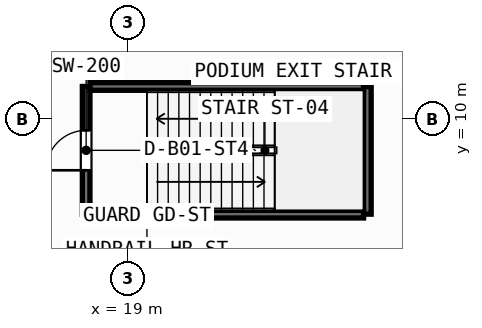
"""IFC4 building model, lengths in metres.
Left out: names, types, materials, properties, quantities, classifications, styles, units other than length and angle.
Written with IfcOpenShell. Run it as: python <this file> out.ifc"""

import sys

from ifc_helpers import new_model, si_unit, direction, frame, frame_2d, origin, place, context, subcontext, project, spatial, rectangle, extrude, source, transform, mapped, element, fill, save


model = new_model("IFC4")
c1 = context("Model", 3, precision=1e-05, world=origin(), true_north=direction((0.0, 1.0)))
c2 = subcontext(c1, "Body", "Model", "MODEL_VIEW")
j1 = project(units=[si_unit("LENGTHUNIT", "METRE"), si_unit("PLANEANGLEUNIT", "RADIAN")], contexts=[c1])
p1 = place(None, origin())
s1 = spatial("IfcSite", under=j1, at=p1, CompositionType="ELEMENT")
p2 = place(p1, origin())
s2 = spatial("IfcBuilding", under=s1, at=p2, CompositionType="ELEMENT")
p3 = place(p2, frame((0.0, 0.0, -4.5)))
s3 = spatial("IfcBuildingStorey", under=s2, at=p3, CompositionType="ELEMENT", Elevation=-4.5)
p4 = place(p3, frame((17.9, 7.5, 0.0), z_axis=(0.0, 0.0, 1.0), x_axis=(0.0, 1.0, 0.0)))
e1 = element("IfcWall", 1, at=p4, inside=s3, PredefinedType="SHEAR", context=c2, shape_type="SweptSolid", body=[
    extrude(rectangle(XDim=3.36, YDim=0.2, at=frame_2d((1.68, 0.0))), origin(), (0.0, 0.0, 1.0), 4.25),
])
p5 = place(p4, frame((1.155, 0.0, 0.0)))
e2 = element("IfcOpeningElement", 2, at=p5, cuts=e1, PredefinedType="OPENING", context=c2, shape_type="SweptSolid", body=[
    extrude(rectangle(XDim=1.05, YDim=2.15, at=frame_2d((0.525, 1.075))), frame((0.0, 0.11, 0.0), z_axis=(0.0, -1.0, 0.0), x_axis=(1.0, 0.0, 0.0)), (0.0, 0.0, 1.0), 0.22),
])
p6 = place(p3, frame((25.3, 10.86, 0.0), z_axis=(0.0, 0.0, 1.0), x_axis=(0.0, -1.0, 0.0)))
e3 = element("IfcWall", 3, at=p6, inside=s3, PredefinedType="SHEAR", context=c2, shape_type="SweptSolid", body=[
    extrude(rectangle(XDim=3.36, YDim=0.2, at=frame_2d((1.68, 0.0))), origin(), (0.0, 0.0, 1.0), 4.25),
])
for number, where, z_axis, x_axis in (
    (4, (25.2, 7.5, 0.0), (0.0, 0.0, 1.0), (-1.0, 0.0, 0.0)),
    (5, (18.0, 10.86, 0.0), (0.0, 0.0, 1.0), (1.0, 0.0, 0.0)),
):
    element("IfcWall", number, at=place(p3, frame(where, z_axis=z_axis, x_axis=x_axis)), inside=s3, PredefinedType="SHEAR", context=c2, shape_type="SweptSolid", body=[
        extrude(rectangle(XDim=7.2, YDim=0.2, at=frame_2d((3.6, 0.0))), origin(), (0.0, 0.0, 1.0), 4.25),
    ])
m1 = source(origin(), c2, "Body", "SweptSolid", [
    extrude(rectangle(XDim=1.05, YDim=2.15, at=frame_2d((0.525, 1.075))), frame((0.0, 0.025, 0.0), z_axis=(0.0, -1.0, 0.0), x_axis=(1.0, 0.0, 0.0)), (0.0, 0.0, 1.0), 0.05),
])
p7 = place(p5, origin())
e6 = element("IfcDoor", 6, at=p7, inside=s3, OperationType="SINGLE_SWING_LEFT", PredefinedType="DOOR", context=c2, shape_type="MappedRepresentation", body=[
    mapped(m1, transform((0.0, 0.0, 0.0), scale=1.0)),
])
fill(e2, e6)
save(model, sys.argv[1])
